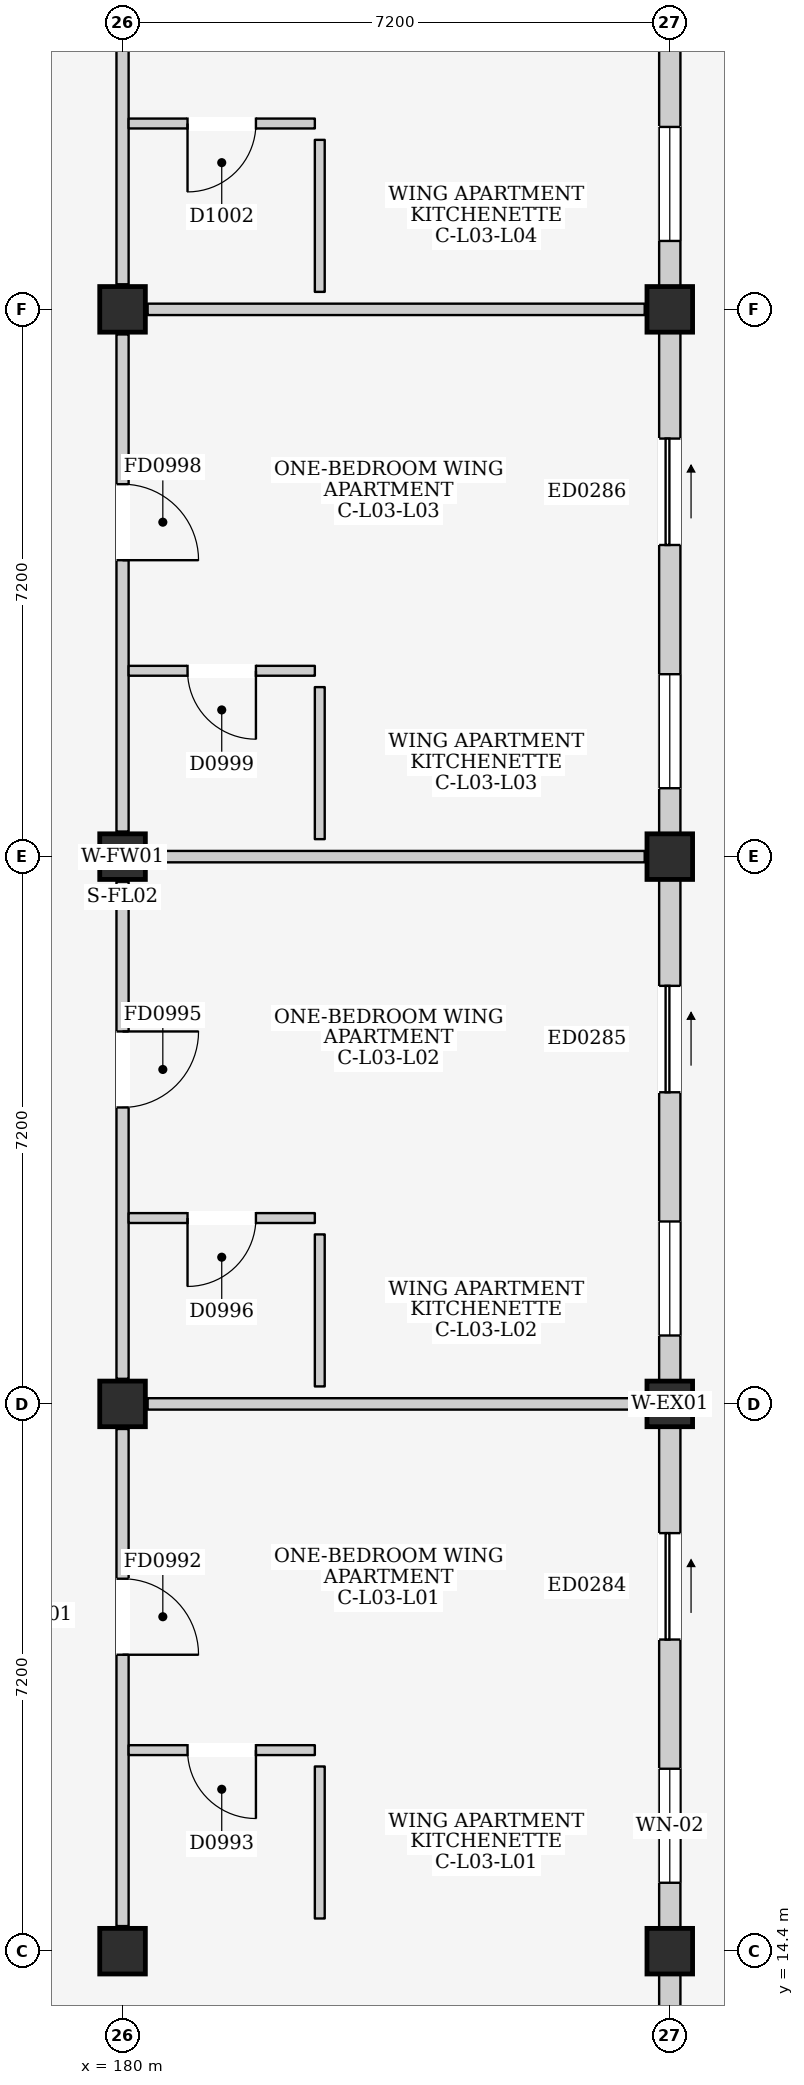
"""IFC4 building model, lengths in metres.
Left out: names, types, materials, properties, quantities, classifications, styles, units other than length and angle.
Written with IfcOpenShell. Run it as: python <this file> out.ifc"""

import sys

from ifc_helpers import new_model, si_unit, direction, frame, frame_2d, origin, origin_2d, place, context, subcontext, project, spatial, rectangle, extrude, element, fill, save


model = new_model("IFC4")
c1 = context("Model", 3, precision=1e-05, world=origin(), true_north=direction((0.0, 1.0)))
c2 = subcontext(c1, "Body", "Model", "MODEL_VIEW")
j1 = project(units=[si_unit("LENGTHUNIT", "METRE"), si_unit("PLANEANGLEUNIT", "RADIAN")], contexts=[c1])
p1 = place(None, origin())
s1 = spatial("IfcSite", under=j1, at=p1, CompositionType="ELEMENT")
p2 = place(p1, origin())
s2 = spatial("IfcBuilding", under=s1, at=p2, CompositionType="ELEMENT")
p3 = place(p2, frame((0.0, 0.0, 12.2)))
s3 = spatial("IfcBuildingStorey", under=s2, at=p3, CompositionType="ELEMENT", Elevation=12.2)
for number, where, z_axis, x_axis in (
    (1, (180.0, 14.4, 0.0), (0.0, 0.0, 1.0), (1.0, 0.0, 0.0)),
    (2, (180.0, 21.6, 0.0), (0.0, 0.0, 1.0), (1.0, 0.0, 0.0)),
    (3, (180.0, 28.8, 0.0), (0.0, 0.0, 1.0), (1.0, 0.0, 0.0)),
    (4, (180.0, 36.0, 0.0), (0.0, 0.0, 1.0), (1.0, 0.0, 0.0)),
    (5, (187.2, 14.4, 0.0), (0.0, 0.0, 1.0), (1.0, 0.0, 0.0)),
    (6, (187.2, 21.6, 0.0), (0.0, 0.0, 1.0), (1.0, 0.0, 0.0)),
    (7, (187.2, 28.8, 0.0), (0.0, 0.0, 1.0), (1.0, 0.0, 0.0)),
    (8, (187.2, 36.0, 0.0), (0.0, 0.0, 1.0), (1.0, 0.0, 0.0)),
):
    element("IfcColumn", number, at=place(p3, frame(where, z_axis=z_axis, x_axis=x_axis)), inside=s3, PredefinedType="COLUMN", context=c2, shape_type="SweptSolid", body=[
        extrude(rectangle(XDim=0.6, YDim=0.6, at=origin_2d()), origin(), (0.0, 0.0, 1.0), 3.2),
    ])
p4 = place(p3, frame((187.2, 7.5, 0.0), z_axis=(0.0, 0.0, 1.0), x_axis=(0.0, 1.0, 0.0)))
e9 = element("IfcWall", 9, at=p4, inside=s3, PredefinedType="ELEMENTEDWALL", context=c2, shape_type="SweptSolid", body=[
    extrude(rectangle(XDim=6.6, YDim=0.28, at=frame_2d((3.3, 0.0))), origin(), (0.0, 0.0, 1.0), 2.445),
])
p5 = place(p4, frame((3.65, 0.0, 0.0)))
e10 = element("IfcOpeningElement", 10, at=p5, cuts=e9, PredefinedType="OPENING", context=c2, shape_type="SweptSolid", body=[
    extrude(rectangle(XDim=1.4, YDim=2.1, at=frame_2d((0.7, 1.05))), frame((0.0, 0.155, 0.0), z_axis=(0.0, -1.0, 0.0), x_axis=(1.0, 0.0, 0.0)), (0.0, 0.0, 1.0), 0.31),
])
p6 = place(p3, frame((187.2, 14.7, 0.0), z_axis=(0.0, 0.0, 1.0), x_axis=(0.0, 1.0, 0.0)))
e11 = element("IfcWall", 11, at=p6, inside=s3, PredefinedType="ELEMENTEDWALL", context=c2, shape_type="SweptSolid", body=[
    extrude(rectangle(XDim=6.6, YDim=0.28, at=frame_2d((3.3, 0.0))), origin(), (0.0, 0.0, 1.0), 2.445),
])
p7 = place(p6, frame((3.8, 0.0, 0.0)))
e12 = element("IfcOpeningElement", 12, at=p7, cuts=e11, PredefinedType="OPENING", context=c2, shape_type="SweptSolid", body=[
    extrude(rectangle(XDim=1.4, YDim=2.1, at=frame_2d((0.7, 1.05))), frame((0.0, 0.155, 0.0), z_axis=(0.0, -1.0, 0.0), x_axis=(1.0, 0.0, 0.0)), (0.0, 0.0, 1.0), 0.31),
])
p8 = place(p6, frame((0.6, 0.0, 0.835)))
e13 = element("IfcOpeningElement", 13, at=p8, cuts=e11, PredefinedType="OPENING", context=c2, shape_type="SweptSolid", body=[
    extrude(rectangle(XDim=1.5, YDim=1.5, at=frame_2d((0.75, 0.75))), frame((0.0, 0.155, 0.0), z_axis=(0.0, -1.0, 0.0), x_axis=(1.0, 0.0, 0.0)), (0.0, 0.0, 1.0), 0.31),
])
p9 = place(p3, frame((187.2, 21.9, 0.0), z_axis=(0.0, 0.0, 1.0), x_axis=(0.0, 1.0, 0.0)))
e14 = element("IfcWall", 14, at=p9, inside=s3, PredefinedType="ELEMENTEDWALL", context=c2, shape_type="SweptSolid", body=[
    extrude(rectangle(XDim=6.6, YDim=0.28, at=frame_2d((3.3, 0.0))), origin(), (0.0, 0.0, 1.0), 2.445),
])
p10 = place(p9, frame((3.8, 0.0, 0.0)))
e15 = element("IfcOpeningElement", 15, at=p10, cuts=e14, PredefinedType="OPENING", context=c2, shape_type="SweptSolid", body=[
    extrude(rectangle(XDim=1.4, YDim=2.1, at=frame_2d((0.7, 1.05))), frame((0.0, 0.155, 0.0), z_axis=(0.0, -1.0, 0.0), x_axis=(1.0, 0.0, 0.0)), (0.0, 0.0, 1.0), 0.31),
])
p11 = place(p9, frame((0.6, 0.0, 0.835)))
e16 = element("IfcOpeningElement", 16, at=p11, cuts=e14, PredefinedType="OPENING", context=c2, shape_type="SweptSolid", body=[
    extrude(rectangle(XDim=1.5, YDim=1.5, at=frame_2d((0.75, 0.75))), frame((0.0, 0.155, 0.0), z_axis=(0.0, -1.0, 0.0), x_axis=(1.0, 0.0, 0.0)), (0.0, 0.0, 1.0), 0.31),
])
p12 = place(p3, frame((187.2, 29.1, 0.0), z_axis=(0.0, 0.0, 1.0), x_axis=(0.0, 1.0, 0.0)))
e17 = element("IfcWall", 17, at=p12, inside=s3, PredefinedType="ELEMENTEDWALL", context=c2, shape_type="SweptSolid", body=[
    extrude(rectangle(XDim=6.6, YDim=0.28, at=frame_2d((3.3, 0.0))), origin(), (0.0, 0.0, 1.0), 2.445),
])
p13 = place(p12, frame((3.8, 0.0, 0.0)))
e18 = element("IfcOpeningElement", 18, at=p13, cuts=e17, PredefinedType="OPENING", context=c2, shape_type="SweptSolid", body=[
    extrude(rectangle(XDim=1.4, YDim=2.1, at=frame_2d((0.7, 1.05))), frame((0.0, 0.155, 0.0), z_axis=(0.0, -1.0, 0.0), x_axis=(1.0, 0.0, 0.0)), (0.0, 0.0, 1.0), 0.31),
])
p14 = place(p12, frame((0.6, 0.0, 0.835)))
e19 = element("IfcOpeningElement", 19, at=p14, cuts=e17, PredefinedType="OPENING", context=c2, shape_type="SweptSolid", body=[
    extrude(rectangle(XDim=1.5, YDim=1.5, at=frame_2d((0.75, 0.75))), frame((0.0, 0.155, 0.0), z_axis=(0.0, -1.0, 0.0), x_axis=(1.0, 0.0, 0.0)), (0.0, 0.0, 1.0), 0.31),
])
p15 = place(p3, frame((187.2, 36.3, 0.0), z_axis=(0.0, 0.0, 1.0), x_axis=(0.0, 1.0, 0.0)))
e20 = element("IfcWall", 20, at=p15, inside=s3, PredefinedType="ELEMENTEDWALL", context=c2, shape_type="SweptSolid", body=[
    extrude(rectangle(XDim=6.6, YDim=0.28, at=frame_2d((3.3, 0.0))), origin(), (0.0, 0.0, 1.0), 2.445),
])
p16 = place(p15, frame((3.8, 0.0, 0.0)))
e21 = element("IfcOpeningElement", 21, at=p16, cuts=e20, PredefinedType="OPENING", context=c2, shape_type="SweptSolid", body=[
    extrude(rectangle(XDim=1.4, YDim=2.1, at=frame_2d((0.7, 1.05))), frame((0.0, 0.155, 0.0), z_axis=(0.0, -1.0, 0.0), x_axis=(1.0, 0.0, 0.0)), (0.0, 0.0, 1.0), 0.31),
])
p17 = place(p15, frame((0.6, 0.0, 0.835)))
e22 = element("IfcOpeningElement", 22, at=p17, cuts=e20, PredefinedType="OPENING", context=c2, shape_type="SweptSolid", body=[
    extrude(rectangle(XDim=1.5, YDim=1.5, at=frame_2d((0.75, 0.75))), frame((0.0, 0.155, 0.0), z_axis=(0.0, -1.0, 0.0), x_axis=(1.0, 0.0, 0.0)), (0.0, 0.0, 1.0), 0.31),
])
p18 = place(p3, frame((180.0, 14.73, 0.0), z_axis=(0.0, 0.0, 1.0), x_axis=(0.0, 1.0, 0.0)))
e23 = element("IfcWall", 23, at=p18, inside=s3, PredefinedType="PARTITIONING", context=c2, shape_type="SweptSolid", body=[
    extrude(rectangle(XDim=6.54, YDim=0.16, at=frame_2d((3.27, 0.0))), origin(), (0.0, 0.0, 1.0), 2.415),
])
p19 = place(p18, frame((3.57, 0.0, 0.0)))
e24 = element("IfcOpeningElement", 24, at=p19, cuts=e23, PredefinedType="OPENING", context=c2, shape_type="SweptSolid", body=[
    extrude(rectangle(XDim=1.0, YDim=2.15, at=frame_2d((0.5, 1.075))), frame((0.0, 0.095, 0.0), z_axis=(0.0, -1.0, 0.0), x_axis=(1.0, 0.0, 0.0)), (0.0, 0.0, 1.0), 0.19),
])
p20 = place(p3, frame((180.33, 21.6, 0.0), z_axis=(0.0, 0.0, 1.0), x_axis=(1.0, 0.0, 0.0)))
e25 = element("IfcWall", 25, at=p20, inside=s3, PredefinedType="PARTITIONING", context=c2, shape_type="SweptSolid", body=[
    extrude(rectangle(XDim=6.54, YDim=0.15, at=frame_2d((3.27, 0.0))), origin(), (0.0, 0.0, 1.0), 2.365),
])
p21 = place(p3, frame((180.08, 17.045, 0.0), z_axis=(0.0, 0.0, 1.0), x_axis=(1.0, 0.0, 0.0)))
e26 = element("IfcWall", 26, at=p21, inside=s3, PredefinedType="PARTITIONING", context=c2, shape_type="SweptSolid", body=[
    extrude(rectangle(XDim=2.45, YDim=0.13, at=frame_2d((1.225, 0.0))), origin(), (0.0, 0.0, 1.0), 2.98),
])
p22 = place(p21, frame((0.775, 0.0, 0.0)))
e27 = element("IfcOpeningElement", 27, at=p22, cuts=e26, PredefinedType="OPENING", context=c2, shape_type="SweptSolid", body=[
    extrude(rectangle(XDim=0.9, YDim=2.1, at=frame_2d((0.45, 1.05))), frame((0.0, 0.08, 0.0), z_axis=(0.0, -1.0, 0.0), x_axis=(1.0, 0.0, 0.0)), (0.0, 0.0, 1.0), 0.16),
])
p23 = place(p3, frame((182.595, 14.83, 0.0), z_axis=(0.0, 0.0, 1.0), x_axis=(0.0, 1.0, 0.0)))
e28 = element("IfcWall", 28, at=p23, inside=s3, PredefinedType="PARTITIONING", context=c2, shape_type="SweptSolid", body=[
    extrude(rectangle(XDim=2.0, YDim=0.13, at=frame_2d((1.0, 0.0))), origin(), (0.0, 0.0, 1.0), 2.98),
])
p24 = place(p3, frame((180.0, 21.93, 0.0), z_axis=(0.0, 0.0, 1.0), x_axis=(0.0, 1.0, 0.0)))
e29 = element("IfcWall", 29, at=p24, inside=s3, PredefinedType="PARTITIONING", context=c2, shape_type="SweptSolid", body=[
    extrude(rectangle(XDim=6.54, YDim=0.16, at=frame_2d((3.27, 0.0))), origin(), (0.0, 0.0, 1.0), 2.415),
])
p25 = place(p24, frame((3.57, 0.0, 0.0)))
e30 = element("IfcOpeningElement", 30, at=p25, cuts=e29, PredefinedType="OPENING", context=c2, shape_type="SweptSolid", body=[
    extrude(rectangle(XDim=1.0, YDim=2.15, at=frame_2d((0.5, 1.075))), frame((0.0, 0.095, 0.0), z_axis=(0.0, -1.0, 0.0), x_axis=(1.0, 0.0, 0.0)), (0.0, 0.0, 1.0), 0.19),
])
p26 = place(p3, frame((180.33, 28.8, 0.0), z_axis=(0.0, 0.0, 1.0), x_axis=(1.0, 0.0, 0.0)))
e31 = element("IfcWall", 31, at=p26, inside=s3, PredefinedType="PARTITIONING", context=c2, shape_type="SweptSolid", body=[
    extrude(rectangle(XDim=6.54, YDim=0.15, at=frame_2d((3.27, 0.0))), origin(), (0.0, 0.0, 1.0), 2.365),
])
p27 = place(p3, frame((180.08, 24.045, 0.0), z_axis=(0.0, 0.0, 1.0), x_axis=(1.0, 0.0, 0.0)))
e32 = element("IfcWall", 32, at=p27, inside=s3, PredefinedType="PARTITIONING", context=c2, shape_type="SweptSolid", body=[
    extrude(rectangle(XDim=2.45, YDim=0.13, at=frame_2d((1.225, 0.0))), origin(), (0.0, 0.0, 1.0), 2.98),
])
p28 = place(p27, frame((0.775, 0.0, 0.0)))
e33 = element("IfcOpeningElement", 33, at=p28, cuts=e32, PredefinedType="OPENING", context=c2, shape_type="SweptSolid", body=[
    extrude(rectangle(XDim=0.9, YDim=2.1, at=frame_2d((0.45, 1.05))), frame((0.0, 0.08, 0.0), z_axis=(0.0, -1.0, 0.0), x_axis=(1.0, 0.0, 0.0)), (0.0, 0.0, 1.0), 0.16),
])
p29 = place(p3, frame((182.595, 21.83, 0.0), z_axis=(0.0, 0.0, 1.0), x_axis=(0.0, 1.0, 0.0)))
e34 = element("IfcWall", 34, at=p29, inside=s3, PredefinedType="PARTITIONING", context=c2, shape_type="SweptSolid", body=[
    extrude(rectangle(XDim=2.0, YDim=0.13, at=frame_2d((1.0, 0.0))), origin(), (0.0, 0.0, 1.0), 2.98),
])
p30 = place(p3, frame((180.0, 29.13, 0.0), z_axis=(0.0, 0.0, 1.0), x_axis=(0.0, 1.0, 0.0)))
e35 = element("IfcWall", 35, at=p30, inside=s3, PredefinedType="PARTITIONING", context=c2, shape_type="SweptSolid", body=[
    extrude(rectangle(XDim=6.54, YDim=0.16, at=frame_2d((3.27, 0.0))), origin(), (0.0, 0.0, 1.0), 2.415),
])
p31 = place(p30, frame((3.57, 0.0, 0.0)))
e36 = element("IfcOpeningElement", 36, at=p31, cuts=e35, PredefinedType="OPENING", context=c2, shape_type="SweptSolid", body=[
    extrude(rectangle(XDim=1.0, YDim=2.15, at=frame_2d((0.5, 1.075))), frame((0.0, 0.095, 0.0), z_axis=(0.0, -1.0, 0.0), x_axis=(1.0, 0.0, 0.0)), (0.0, 0.0, 1.0), 0.19),
])
p32 = place(p3, frame((180.33, 36.0, 0.0), z_axis=(0.0, 0.0, 1.0), x_axis=(1.0, 0.0, 0.0)))
e37 = element("IfcWall", 37, at=p32, inside=s3, PredefinedType="PARTITIONING", context=c2, shape_type="SweptSolid", body=[
    extrude(rectangle(XDim=6.54, YDim=0.15, at=frame_2d((3.27, 0.0))), origin(), (0.0, 0.0, 1.0), 2.365),
])
p33 = place(p3, frame((180.08, 31.245, 0.0), z_axis=(0.0, 0.0, 1.0), x_axis=(1.0, 0.0, 0.0)))
e38 = element("IfcWall", 38, at=p33, inside=s3, PredefinedType="PARTITIONING", context=c2, shape_type="SweptSolid", body=[
    extrude(rectangle(XDim=2.45, YDim=0.13, at=frame_2d((1.225, 0.0))), origin(), (0.0, 0.0, 1.0), 2.98),
])
p34 = place(p33, frame((0.775, 0.0, 0.0)))
e39 = element("IfcOpeningElement", 39, at=p34, cuts=e38, PredefinedType="OPENING", context=c2, shape_type="SweptSolid", body=[
    extrude(rectangle(XDim=0.9, YDim=2.1, at=frame_2d((0.45, 1.05))), frame((0.0, 0.08, 0.0), z_axis=(0.0, -1.0, 0.0), x_axis=(1.0, 0.0, 0.0)), (0.0, 0.0, 1.0), 0.16),
])
p35 = place(p3, frame((182.595, 29.03, 0.0), z_axis=(0.0, 0.0, 1.0), x_axis=(0.0, 1.0, 0.0)))
e40 = element("IfcWall", 40, at=p35, inside=s3, PredefinedType="PARTITIONING", context=c2, shape_type="SweptSolid", body=[
    extrude(rectangle(XDim=2.0, YDim=0.13, at=frame_2d((1.0, 0.0))), origin(), (0.0, 0.0, 1.0), 2.98),
])
p36 = place(p3, frame((180.0, 36.33, 0.0), z_axis=(0.0, 0.0, 1.0), x_axis=(0.0, 1.0, 0.0)))
e41 = element("IfcWall", 41, at=p36, inside=s3, PredefinedType="PARTITIONING", context=c2, shape_type="SweptSolid", body=[
    extrude(rectangle(XDim=6.54, YDim=0.16, at=frame_2d((3.27, 0.0))), origin(), (0.0, 0.0, 1.0), 2.415),
])
p37 = place(p36, frame((3.57, 0.0, 0.0)))
e42 = element("IfcOpeningElement", 42, at=p37, cuts=e41, PredefinedType="OPENING", context=c2, shape_type="SweptSolid", body=[
    extrude(rectangle(XDim=1.0, YDim=2.15, at=frame_2d((0.5, 1.075))), frame((0.0, 0.095, 0.0), z_axis=(0.0, -1.0, 0.0), x_axis=(1.0, 0.0, 0.0)), (0.0, 0.0, 1.0), 0.19),
])
p38 = place(p3, frame((180.08, 38.445, 0.0), z_axis=(0.0, 0.0, 1.0), x_axis=(1.0, 0.0, 0.0)))
e43 = element("IfcWall", 43, at=p38, inside=s3, PredefinedType="PARTITIONING", context=c2, shape_type="SweptSolid", body=[
    extrude(rectangle(XDim=2.45, YDim=0.13, at=frame_2d((1.225, 0.0))), origin(), (0.0, 0.0, 1.0), 2.98),
])
p39 = place(p38, frame((0.775, 0.0, 0.0)))
e44 = element("IfcOpeningElement", 44, at=p39, cuts=e43, PredefinedType="OPENING", context=c2, shape_type="SweptSolid", body=[
    extrude(rectangle(XDim=0.9, YDim=2.1, at=frame_2d((0.45, 1.05))), frame((0.0, 0.08, 0.0), z_axis=(0.0, -1.0, 0.0), x_axis=(1.0, 0.0, 0.0)), (0.0, 0.0, 1.0), 0.16),
])
p40 = place(p3, frame((182.595, 36.23, 0.0), z_axis=(0.0, 0.0, 1.0), x_axis=(0.0, 1.0, 0.0)))
e45 = element("IfcWall", 45, at=p40, inside=s3, PredefinedType="PARTITIONING", context=c2, shape_type="SweptSolid", body=[
    extrude(rectangle(XDim=2.0, YDim=0.13, at=frame_2d((1.0, 0.0))), origin(), (0.0, 0.0, 1.0), 2.98),
])
p41 = place(p7, frame((1.4, 0.0, 0.0), z_axis=(0.0, 0.0, 1.0), x_axis=(-1.0, 0.0, 0.0)))
e46 = element("IfcDoor", 46, at=p41, inside=s3, OperationType="SLIDING_TO_RIGHT", PredefinedType="DOOR", context=c2, shape_type="SweptSolid", body=[
    extrude(rectangle(XDim=1.4, YDim=2.1, at=frame_2d((0.7, 1.05))), frame((0.0, 0.025, 0.0), z_axis=(0.0, -1.0, 0.0), x_axis=(1.0, 0.0, 0.0)), (0.0, 0.0, 1.0), 0.05),
])
fill(e12, e46)
p42 = place(p8, origin())
e47 = element("IfcWindow", 47, at=p42, inside=s3, PartitioningType="DOUBLE_PANEL_VERTICAL", PredefinedType="WINDOW", context=c2, shape_type="SweptSolid", body=[
    extrude(rectangle(XDim=1.5, YDim=1.5, at=frame_2d((0.75, 0.75))), frame((0.0, 0.03, 0.0), z_axis=(0.0, -1.0, 0.0), x_axis=(1.0, 0.0, 0.0)), (0.0, 0.0, 1.0), 0.06),
])
fill(e13, e47)
p43 = place(p10, frame((1.4, 0.0, 0.0), z_axis=(0.0, 0.0, 1.0), x_axis=(-1.0, 0.0, 0.0)))
e48 = element("IfcDoor", 48, at=p43, inside=s3, OperationType="SLIDING_TO_RIGHT", PredefinedType="DOOR", context=c2, shape_type="SweptSolid", body=[
    extrude(rectangle(XDim=1.4, YDim=2.1, at=frame_2d((0.7, 1.05))), frame((0.0, 0.025, 0.0), z_axis=(0.0, -1.0, 0.0), x_axis=(1.0, 0.0, 0.0)), (0.0, 0.0, 1.0), 0.05),
])
fill(e15, e48)
p44 = place(p11, origin())
e49 = element("IfcWindow", 49, at=p44, inside=s3, PartitioningType="DOUBLE_PANEL_VERTICAL", PredefinedType="WINDOW", context=c2, shape_type="SweptSolid", body=[
    extrude(rectangle(XDim=1.5, YDim=1.5, at=frame_2d((0.75, 0.75))), frame((0.0, 0.03, 0.0), z_axis=(0.0, -1.0, 0.0), x_axis=(1.0, 0.0, 0.0)), (0.0, 0.0, 1.0), 0.06),
])
fill(e16, e49)
p45 = place(p13, frame((1.4, 0.0, 0.0), z_axis=(0.0, 0.0, 1.0), x_axis=(-1.0, 0.0, 0.0)))
e50 = element("IfcDoor", 50, at=p45, inside=s3, OperationType="SLIDING_TO_RIGHT", PredefinedType="DOOR", context=c2, shape_type="SweptSolid", body=[
    extrude(rectangle(XDim=1.4, YDim=2.1, at=frame_2d((0.7, 1.05))), frame((0.0, 0.025, 0.0), z_axis=(0.0, -1.0, 0.0), x_axis=(1.0, 0.0, 0.0)), (0.0, 0.0, 1.0), 0.05),
])
fill(e18, e50)
p46 = place(p14, origin())
e51 = element("IfcWindow", 51, at=p46, inside=s3, PartitioningType="DOUBLE_PANEL_VERTICAL", PredefinedType="WINDOW", context=c2, shape_type="SweptSolid", body=[
    extrude(rectangle(XDim=1.5, YDim=1.5, at=frame_2d((0.75, 0.75))), frame((0.0, 0.03, 0.0), z_axis=(0.0, -1.0, 0.0), x_axis=(1.0, 0.0, 0.0)), (0.0, 0.0, 1.0), 0.06),
])
fill(e19, e51)
p47 = place(p17, origin())
e52 = element("IfcWindow", 52, at=p47, inside=s3, PartitioningType="DOUBLE_PANEL_VERTICAL", PredefinedType="WINDOW", context=c2, shape_type="SweptSolid", body=[
    extrude(rectangle(XDim=1.5, YDim=1.5, at=frame_2d((0.75, 0.75))), frame((0.0, 0.03, 0.0), z_axis=(0.0, -1.0, 0.0), x_axis=(1.0, 0.0, 0.0)), (0.0, 0.0, 1.0), 0.06),
])
fill(e22, e52)
p48 = place(p19, frame((1.0, 0.0, 0.0), z_axis=(0.0, 0.0, 1.0), x_axis=(-1.0, 0.0, 0.0)))
e53 = element("IfcDoor", 53, at=p48, inside=s3, OperationType="SINGLE_SWING_RIGHT", PredefinedType="DOOR", context=c2, shape_type="SweptSolid", body=[
    extrude(rectangle(XDim=1.0, YDim=2.15, at=frame_2d((0.5, 1.075))), frame((0.0, 0.025, 0.0), z_axis=(0.0, -1.0, 0.0), x_axis=(1.0, 0.0, 0.0)), (0.0, 0.0, 1.0), 0.05),
])
fill(e24, e53)
p49 = place(p22, frame((0.9, 0.0, 0.0), z_axis=(0.0, 0.0, 1.0), x_axis=(-1.0, 0.0, 0.0)))
e54 = element("IfcDoor", 54, at=p49, inside=s3, OperationType="SINGLE_SWING_LEFT", PredefinedType="DOOR", context=c2, shape_type="SweptSolid", body=[
    extrude(rectangle(XDim=0.9, YDim=2.1, at=frame_2d((0.45, 1.05))), frame((0.0, 0.025, 0.0), z_axis=(0.0, -1.0, 0.0), x_axis=(1.0, 0.0, 0.0)), (0.0, 0.0, 1.0), 0.05),
])
fill(e27, e54)
p50 = place(p25, frame((1.0, 0.0, 0.0), z_axis=(0.0, 0.0, 1.0), x_axis=(-1.0, 0.0, 0.0)))
e55 = element("IfcDoor", 55, at=p50, inside=s3, OperationType="SINGLE_SWING_LEFT", PredefinedType="DOOR", context=c2, shape_type="SweptSolid", body=[
    extrude(rectangle(XDim=1.0, YDim=2.15, at=frame_2d((0.5, 1.075))), frame((0.0, 0.025, 0.0), z_axis=(0.0, -1.0, 0.0), x_axis=(1.0, 0.0, 0.0)), (0.0, 0.0, 1.0), 0.05),
])
fill(e30, e55)
p51 = place(p28, frame((0.9, 0.0, 0.0), z_axis=(0.0, 0.0, 1.0), x_axis=(-1.0, 0.0, 0.0)))
e56 = element("IfcDoor", 56, at=p51, inside=s3, OperationType="SINGLE_SWING_RIGHT", PredefinedType="DOOR", context=c2, shape_type="SweptSolid", body=[
    extrude(rectangle(XDim=0.9, YDim=2.1, at=frame_2d((0.45, 1.05))), frame((0.0, 0.025, 0.0), z_axis=(0.0, -1.0, 0.0), x_axis=(1.0, 0.0, 0.0)), (0.0, 0.0, 1.0), 0.05),
])
fill(e33, e56)
p52 = place(p31, frame((1.0, 0.0, 0.0), z_axis=(0.0, 0.0, 1.0), x_axis=(-1.0, 0.0, 0.0)))
e57 = element("IfcDoor", 57, at=p52, inside=s3, OperationType="SINGLE_SWING_RIGHT", PredefinedType="DOOR", context=c2, shape_type="SweptSolid", body=[
    extrude(rectangle(XDim=1.0, YDim=2.15, at=frame_2d((0.5, 1.075))), frame((0.0, 0.025, 0.0), z_axis=(0.0, -1.0, 0.0), x_axis=(1.0, 0.0, 0.0)), (0.0, 0.0, 1.0), 0.05),
])
fill(e36, e57)
p53 = place(p34, frame((0.9, 0.0, 0.0), z_axis=(0.0, 0.0, 1.0), x_axis=(-1.0, 0.0, 0.0)))
e58 = element("IfcDoor", 58, at=p53, inside=s3, OperationType="SINGLE_SWING_LEFT", PredefinedType="DOOR", context=c2, shape_type="SweptSolid", body=[
    extrude(rectangle(XDim=0.9, YDim=2.1, at=frame_2d((0.45, 1.05))), frame((0.0, 0.025, 0.0), z_axis=(0.0, -1.0, 0.0), x_axis=(1.0, 0.0, 0.0)), (0.0, 0.0, 1.0), 0.05),
])
fill(e39, e58)
p54 = place(p39, frame((0.9, 0.0, 0.0), z_axis=(0.0, 0.0, 1.0), x_axis=(-1.0, 0.0, 0.0)))
e59 = element("IfcDoor", 59, at=p54, inside=s3, OperationType="SINGLE_SWING_RIGHT", PredefinedType="DOOR", context=c2, shape_type="SweptSolid", body=[
    extrude(rectangle(XDim=0.9, YDim=2.1, at=frame_2d((0.45, 1.05))), frame((0.0, 0.025, 0.0), z_axis=(0.0, -1.0, 0.0), x_axis=(1.0, 0.0, 0.0)), (0.0, 0.0, 1.0), 0.05),
])
fill(e44, e59)
save(model, sys.argv[1])
